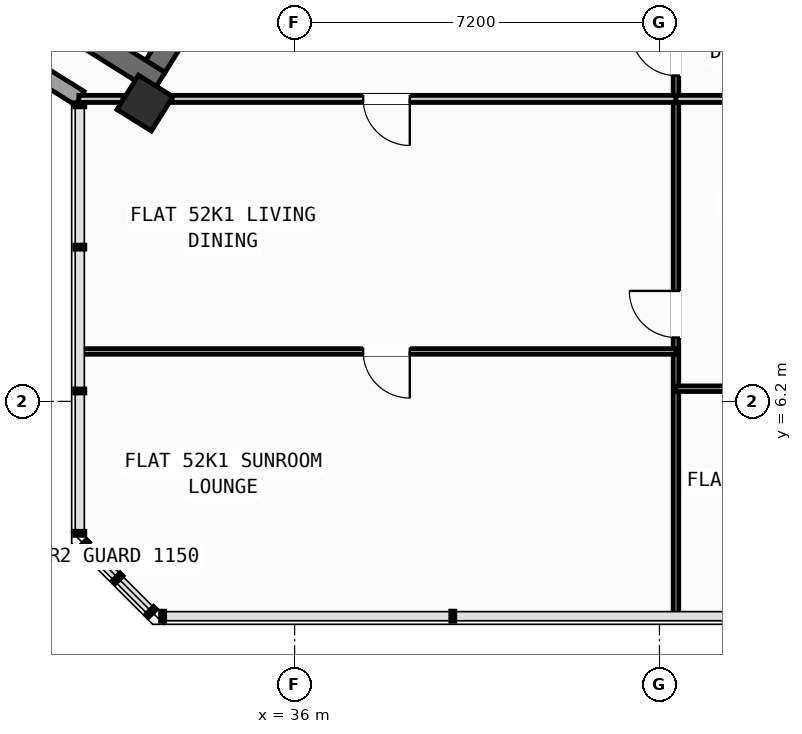
"""IFC4 building model, lengths in metres.
Left out: names, types, materials, properties, quantities, classifications, styles, units other than length and angle.
Written with IfcOpenShell. Run it as: python <this file> out.ifc"""

import sys

from ifc_helpers import new_model, si_unit, direction, frame, frame_2d, origin, origin_2d, place, context, subcontext, project, spatial, rectangle, hollow_rectangle, extrude, source, transform, mapped, element, fill, save


model = new_model("IFC4")
c1 = context("Model", 3, precision=1e-05, world=origin(), true_north=direction((0.0, 1.0)))
c2 = subcontext(c1, "Body", "Model", "MODEL_VIEW")
j1 = project(units=[si_unit("LENGTHUNIT", "METRE"), si_unit("PLANEANGLEUNIT", "RADIAN")], contexts=[c1])
p1 = place(None, origin())
s1 = spatial("IfcSite", under=j1, at=p1, CompositionType="ELEMENT")
p2 = place(p1, origin())
s2 = spatial("IfcBuilding", under=s1, at=p2, CompositionType="ELEMENT")
p3 = place(p2, frame((0.0, 0.0, 207.6)))
s3 = spatial("IfcBuildingStorey", under=s2, at=p3, CompositionType="ELEMENT", Elevation=207.6)
p4 = place(p3, frame((33.324, 12.503, 0.0), z_axis=(0.0, 0.0, 1.0), x_axis=(-0.848043529849, 0.529926571782, 0.0)))
e1 = element("IfcWall", 1, at=p4, inside=s3, PredefinedType="SHEAR", context=c2, shape_type="SweptSolid", body=[
    extrude(rectangle(XDim=13.04, YDim=0.45, at=frame_2d((6.52, 0.0))), origin(), (0.0, 0.0, 1.0), 3.35),
])
p5 = place(p3, frame((36.683, 18.304, 0.0), z_axis=(0.0, 0.0, 1.0), x_axis=(-0.529904039071, -0.848057609704, 0.0)))
e2 = element("IfcWall", 2, at=p5, inside=s3, PredefinedType="SHEAR", context=c2, shape_type="SweptSolid", body=[
    extrude(rectangle(XDim=6.475, YDim=0.45, at=frame_2d((3.238, 0.0))), origin(), (0.0, 0.0, 1.0), 3.35),
])
m1 = source(origin(), c2, "Body", "SweptSolid", [
    extrude(hollow_rectangle(XDim=0.8, YDim=0.8, WallThickness=0.032, at=origin_2d()), origin(), (0.0, 0.0, 1.0), 3.6),
])
p6 = place(p3, frame((33.046, 12.087, 0.0), z_axis=(0.0, 0.0, 1.0), x_axis=(-0.848048096156, 0.529919264233, 0.0)))
e3 = element("IfcColumn", 3, at=p6, inside=s3, PredefinedType="COLUMN", context=c2, shape_type="MappedRepresentation", body=[
    mapped(m1, transform((0.0, 0.0, 0.0), scale=1.0)),
])
p7 = place(p3, frame((31.76, 12.183, 0.0), z_axis=(0.0, 0.0, 1.0), x_axis=(-0.848047074256, 0.529920899612, 0.0)))
e4 = element("IfcWall", 4, at=p7, inside=s3, PredefinedType="STANDARD", context=c2, shape_type="SweptSolid", body=[
    extrude(rectangle(XDim=30.652, YDim=0.32, at=frame_2d((15.326, 0.0))), origin(), (0.0, 0.0, 1.0), 3.35),
])
p8 = place(p7, frame((15.166, 0.0, 0.0)))
e5 = element("IfcOpeningElement", 5, at=p8, cuts=e4, PredefinedType="OPENING", context=c2, shape_type="SweptSolid", body=[
    extrude(rectangle(XDim=1.2, YDim=2.15, at=frame_2d((0.6, 1.075))), frame((0.0, 0.17, 0.0), z_axis=(0.0, -1.0, 0.0), x_axis=(1.0, 0.0, 0.0)), (0.0, 0.0, 1.0), 0.34),
])
p9 = place(p7, frame((2.24, 0.0, 0.9)))
e6 = element("IfcOpeningElement", 6, at=p9, cuts=e4, PredefinedType="OPENING", context=c2, shape_type="SweptSolid", body=[
    extrude(rectangle(XDim=1.65, YDim=1.45, at=frame_2d((0.825, 0.725))), frame((0.0, 0.17, 0.0), z_axis=(0.0, -1.0, 0.0), x_axis=(1.0, 0.0, 0.0)), (0.0, 0.0, 1.0), 0.34),
])
p10 = place(p7, frame((7.469, 0.0, 0.9)))
e7 = element("IfcOpeningElement", 7, at=p10, cuts=e4, PredefinedType="OPENING", context=c2, shape_type="SweptSolid", body=[
    extrude(rectangle(XDim=1.65, YDim=1.45, at=frame_2d((0.825, 0.725))), frame((0.0, 0.17, 0.0), z_axis=(0.0, -1.0, 0.0), x_axis=(1.0, 0.0, 0.0)), (0.0, 0.0, 1.0), 0.34),
])
p11 = place(p7, frame((12.623, 0.0, 1.0)))
e8 = element("IfcOpeningElement", 8, at=p11, cuts=e4, PredefinedType="OPENING", context=c2, shape_type="SweptSolid", body=[
    extrude(rectangle(XDim=0.9, YDim=1.25, at=frame_2d((0.45, 0.625))), frame((0.0, 0.17, 0.0), z_axis=(0.0, -1.0, 0.0), x_axis=(1.0, 0.0, 0.0)), (0.0, 0.0, 1.0), 0.34),
])
p12 = place(p7, frame((19.715, 0.0, 1.0)))
e9 = element("IfcOpeningElement", 9, at=p12, cuts=e4, PredefinedType="OPENING", context=c2, shape_type="SweptSolid", body=[
    extrude(rectangle(XDim=0.9, YDim=1.25, at=frame_2d((0.45, 0.625))), frame((0.0, 0.17, 0.0), z_axis=(0.0, -1.0, 0.0), x_axis=(1.0, 0.0, 0.0)), (0.0, 0.0, 1.0), 0.34),
])
p13 = place(p7, frame((25.566, 0.0, 0.9)))
e10 = element("IfcOpeningElement", 10, at=p13, cuts=e4, PredefinedType="OPENING", context=c2, shape_type="SweptSolid", body=[
    extrude(rectangle(XDim=1.65, YDim=1.45, at=frame_2d((0.825, 0.725))), frame((0.0, 0.17, 0.0), z_axis=(0.0, -1.0, 0.0), x_axis=(1.0, 0.0, 0.0)), (0.0, 0.0, 1.0), 0.34),
])
p14 = place(p7, frame((28.896, 0.0, 1.0)))
e11 = element("IfcOpeningElement", 11, at=p14, cuts=e4, PredefinedType="OPENING", context=c2, shape_type="SweptSolid", body=[
    extrude(rectangle(XDim=0.9, YDim=1.25, at=frame_2d((0.45, 0.625))), frame((0.0, 0.17, 0.0), z_axis=(0.0, -1.0, 0.0), x_axis=(1.0, 0.0, 0.0)), (0.0, 0.0, 1.0), 0.34),
])
p15 = place(p3, frame((43.526, 1.96, 0.0), z_axis=(0.0, 0.0, 1.0), x_axis=(0.0, 1.0, 0.0)))
e12 = element("IfcWall", 12, at=p15, inside=s3, PredefinedType="PARTITIONING", context=c2, shape_type="SweptSolid", body=[
    extrude(rectangle(XDim=13.46, YDim=0.11, at=frame_2d((6.73, 0.0))), origin(), (0.0, 0.0, 1.0), 3.34),
])
p16 = place(p15, frame((5.5, 0.0, 0.0)))
e13 = element("IfcOpeningElement", 13, at=p16, cuts=e12, PredefinedType="OPENING", context=c2, shape_type="SweptSolid", body=[
    extrude(rectangle(XDim=0.92, YDim=2.08, at=frame_2d((0.46, 1.04))), frame((0.0, 0.065, 0.0), z_axis=(0.0, -1.0, 0.0), x_axis=(1.0, 0.0, 0.0)), (0.0, 0.0, 1.0), 0.13),
])
p17 = place(p15, frame((10.67, 0.0, 0.0)))
e14 = element("IfcOpeningElement", 14, at=p17, cuts=e12, PredefinedType="OPENING", context=c2, shape_type="SweptSolid", body=[
    extrude(rectangle(XDim=0.88, YDim=2.08, at=frame_2d((0.44, 1.04))), frame((0.0, 0.065, 0.0), z_axis=(0.0, -1.0, 0.0), x_axis=(1.0, 0.0, 0.0)), (0.0, 0.0, 1.0), 0.13),
])
p18 = place(p3, frame((31.74, 12.17, 0.0), z_axis=(0.0, 0.0, 1.0), x_axis=(1.0, 0.0, 0.0)))
e15 = element("IfcWall", 15, at=p18, inside=s3, PredefinedType="PLUMBINGWALL", context=c2, shape_type="SweptSolid", body=[
    extrude(rectangle(XDim=0.872, YDim=0.14, at=frame_2d((0.436, 0.0))), origin(), (0.0, 0.0, 1.0), 3.34),
])
p19 = place(p3, frame((33.584, 12.17, 0.0), z_axis=(0.0, 0.0, 1.0), x_axis=(1.0, 0.0, 0.0)))
e16 = element("IfcWall", 16, at=p19, inside=s3, PredefinedType="PLUMBINGWALL", context=c2, shape_type="SweptSolid", body=[
    extrude(rectangle(XDim=9.942, YDim=0.14, at=frame_2d((4.971, 0.0))), origin(), (0.0, 0.0, 1.0), 2.525),
])
p20 = place(p19, frame((3.769, 0.0, 0.0)))
e17 = element("IfcOpeningElement", 17, at=p20, cuts=e16, PredefinedType="OPENING", context=c2, shape_type="SweptSolid", body=[
    extrude(rectangle(XDim=0.92, YDim=2.08, at=frame_2d((0.46, 1.04))), frame((0.0, 0.08, 0.0), z_axis=(0.0, -1.0, 0.0), x_axis=(1.0, 0.0, 0.0)), (0.0, 0.0, 1.0), 0.16),
])
p21 = place(p3, frame((43.526, 12.17, 0.0), z_axis=(0.0, 0.0, 1.0), x_axis=(1.0, 0.0, 0.0)))
e18 = element("IfcWall", 18, at=p21, inside=s3, PredefinedType="PLUMBINGWALL", context=c2, shape_type="SweptSolid", body=[
    extrude(rectangle(XDim=8.734, YDim=0.14, at=frame_2d((4.367, 0.0))), origin(), (0.0, 0.0, 1.0), 2.525),
])
p22 = place(p3, frame((31.74, 7.185, 0.0), z_axis=(0.0, 0.0, 1.0), x_axis=(1.0, 0.0, 0.0)))
e19 = element("IfcWall", 19, at=p22, inside=s3, PredefinedType="PARTITIONING", context=c2, shape_type="SweptSolid", body=[
    extrude(rectangle(XDim=11.786, YDim=0.11, at=frame_2d((5.893, 0.0))), origin(), (0.0, 0.0, 1.0), 3.34),
])
p23 = place(p22, frame((5.613, 0.0, 0.0)))
e20 = element("IfcOpeningElement", 20, at=p23, cuts=e19, PredefinedType="OPENING", context=c2, shape_type="SweptSolid", body=[
    extrude(rectangle(XDim=0.92, YDim=2.08, at=frame_2d((0.46, 1.04))), frame((0.0, 0.065, 0.0), z_axis=(0.0, -1.0, 0.0), x_axis=(1.0, 0.0, 0.0)), (0.0, 0.0, 1.0), 0.13),
])
p24 = place(p3, frame((43.526, 6.45, 0.0), z_axis=(0.0, 0.0, 1.0), x_axis=(1.0, 0.0, 0.0)))
e21 = element("IfcWall", 21, at=p24, inside=s3, PredefinedType="PARTITIONING", context=c2, shape_type="SweptSolid", body=[
    extrude(rectangle(XDim=8.734, YDim=0.11, at=frame_2d((4.367, 0.0))), origin(), (0.0, 0.0, 1.0), 3.34),
])
p25 = place(p24, frame((3.677, 0.0, 0.0)))
e22 = element("IfcOpeningElement", 22, at=p25, cuts=e21, PredefinedType="OPENING", context=c2, shape_type="SweptSolid", body=[
    extrude(rectangle(XDim=0.92, YDim=2.08, at=frame_2d((0.46, 1.04))), frame((0.0, 0.065, 0.0), z_axis=(0.0, -1.0, 0.0), x_axis=(1.0, 0.0, 0.0)), (0.0, 0.0, 1.0), 0.13),
])
m2 = source(origin(), c2, "Body", "SweptSolid", [
    extrude(rectangle(XDim=0.92, YDim=2.08, at=frame_2d((0.46, 1.04))), frame((0.0, 0.025, 0.0), z_axis=(0.0, -1.0, 0.0), x_axis=(1.0, 0.0, 0.0)), (0.0, 0.0, 1.0), 0.05),
])
p26 = place(p23, frame((0.92, 0.0, 0.0), z_axis=(0.0, 0.0, 1.0), x_axis=(-1.0, 0.0, 0.0)))
e23 = element("IfcDoor", 23, at=p26, inside=s3, OperationType="SINGLE_SWING_LEFT", PredefinedType="DOOR", context=c2, shape_type="MappedRepresentation", body=[
    mapped(m2, transform((0.0, 0.0, 0.0), scale=1.0)),
])
fill(e20, e23)
p27 = place(p16, origin())
e24 = element("IfcDoor", 24, at=p27, inside=s3, OperationType="SINGLE_SWING_RIGHT", PredefinedType="DOOR", context=c2, shape_type="MappedRepresentation", body=[
    mapped(m2, transform((0.0, 0.0, 0.0), scale=1.0)),
])
fill(e13, e24)
p28 = place(p20, frame((0.92, 0.0, 0.0), z_axis=(0.0, 0.0, 1.0), x_axis=(-1.0, 0.0, 0.0)))
e25 = element("IfcDoor", 25, at=p28, inside=s3, OperationType="SINGLE_SWING_LEFT", PredefinedType="DOOR", context=c2, shape_type="MappedRepresentation", body=[
    mapped(m2, transform((0.0, 0.0, 0.0), scale=1.0)),
])
fill(e17, e25)
m3 = source(origin(), c2, "Body", "SweptSolid", [
    extrude(rectangle(XDim=0.88, YDim=2.08, at=frame_2d((0.44, 1.04))), frame((0.0, 0.025, 0.0), z_axis=(0.0, -1.0, 0.0), x_axis=(1.0, 0.0, 0.0)), (0.0, 0.0, 1.0), 0.05),
])
p29 = place(p17, origin())
e26 = element("IfcDoor", 26, at=p29, inside=s3, OperationType="SINGLE_SWING_RIGHT", PredefinedType="DOOR", context=c2, shape_type="MappedRepresentation", body=[
    mapped(m3, transform((0.0, 0.0, 0.0), scale=1.0)),
])
fill(e14, e26)
save(model, sys.argv[1])
